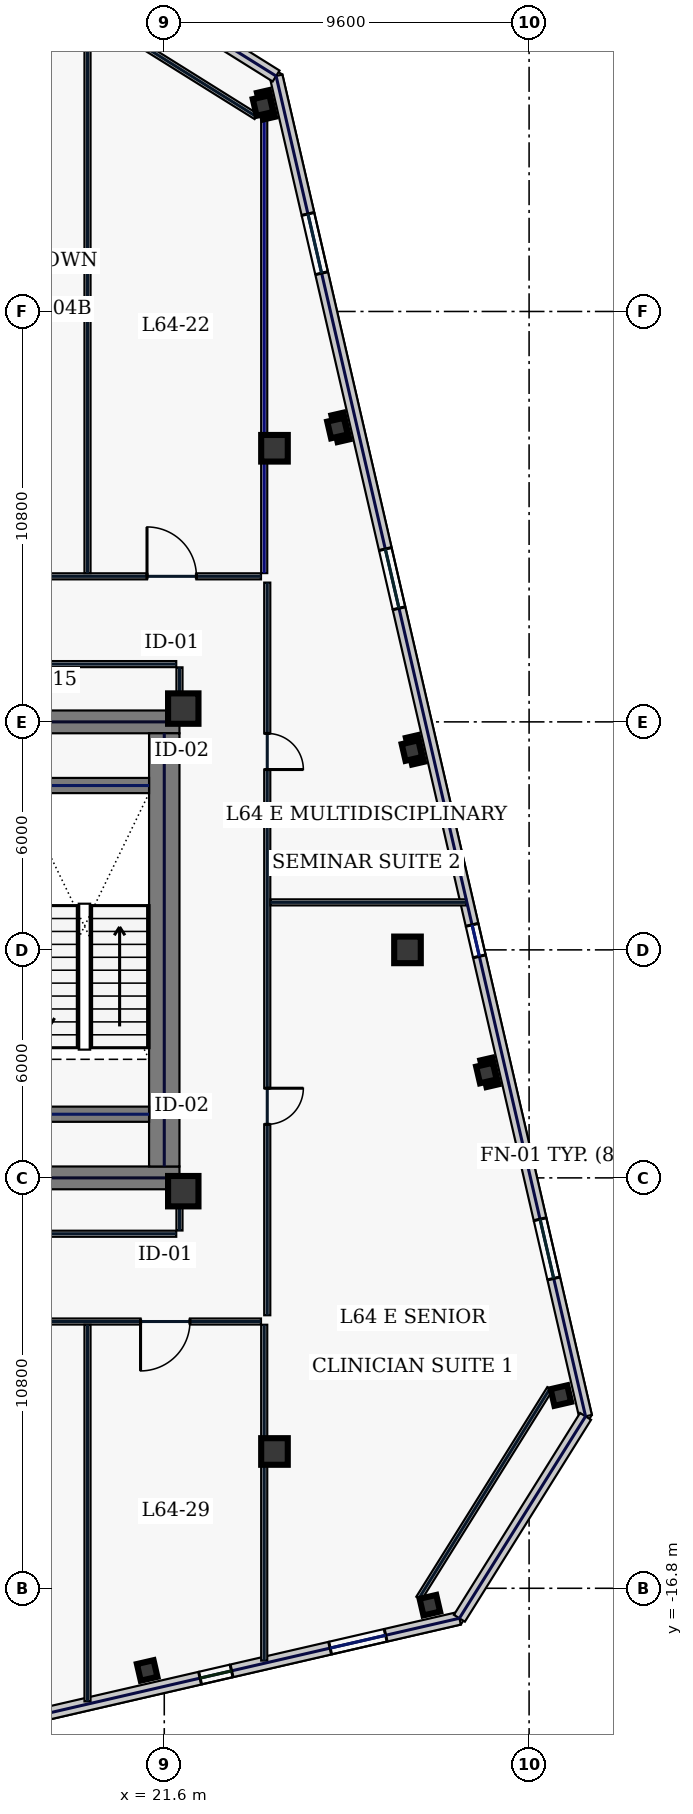
"""IFC4 building model, lengths in metres.
Left out: names, types, materials, properties, quantities, classifications, styles, units other than length and angle.
Written with IfcOpenShell. Run it as: python <this file> out.ifc"""

import sys

from ifc_helpers import new_model, si_unit, direction, frame, frame_2d, origin, origin_2d, place, context, subcontext, project, spatial, rectangle, hollow_rectangle, extrude, element, fill, save


model = new_model("IFC4")
c1 = context("Model", 3, precision=1e-05, world=origin(), true_north=direction((0.0, 1.0)))
c2 = subcontext(c1, "Body", "Model", "MODEL_VIEW")
j1 = project(units=[si_unit("LENGTHUNIT", "METRE"), si_unit("PLANEANGLEUNIT", "RADIAN")], contexts=[c1])
p1 = place(None, origin())
s1 = spatial("IfcSite", under=j1, at=p1, CompositionType="ELEMENT")
p2 = place(p1, origin())
s2 = spatial("IfcBuilding", under=s1, at=p2, CompositionType="ELEMENT")
p3 = place(p2, frame((0.0, 0.0, 277.0)))
s3 = spatial("IfcBuildingStorey", under=s2, at=p3, CompositionType="ELEMENT", Elevation=277.0)
for number, where, z_axis, x_axis in (
    (1, (10.5, 6.0, 0.0), (0.0, 0.0, 1.0), (1.0, 0.0, 0.0)),
    (2, (10.5, -6.0, 0.0), (0.0, 0.0, 1.0), (1.0, 0.0, 0.0)),
):
    element("IfcWall", number, at=place(p3, frame(where, z_axis=z_axis, x_axis=x_axis)), inside=s3, PredefinedType="SHEAR", context=c2, shape_type="SweptSolid", body=[
        extrude(rectangle(XDim=11.5, YDim=0.6, at=frame_2d((5.75, 0.0))), origin(), (0.0, 0.0, 1.0), 3.74),
    ])
p4 = place(p3, frame((21.6, -5.7, 0.0), z_axis=(0.0, 0.0, 1.0), x_axis=(0.0, 1.0, 0.0)))
e3 = element("IfcWall", 3, at=p4, inside=s3, PredefinedType="SHEAR", context=c2, shape_type="SweptSolid", body=[
    extrude(rectangle(XDim=11.4, YDim=0.8, at=frame_2d((5.7, 0.0))), origin(), (0.0, 0.0, 1.0), 3.74),
])
for number, where, z_axis, x_axis in (
    (4, (17.8, -4.325, 0.0), (0.0, 0.0, 1.0), (1.0, 0.0, 0.0)),
    (5, (17.8, 4.325, 0.0), (0.0, 0.0, 1.0), (1.0, 0.0, 0.0)),
):
    element("IfcWall", number, at=place(p3, frame(where, z_axis=z_axis, x_axis=x_axis)), inside=s3, PredefinedType="SHEAR", context=c2, shape_type="SweptSolid", body=[
        extrude(rectangle(XDim=3.4, YDim=0.4, at=frame_2d((1.7, 0.0))), origin(), (0.0, 0.0, 1.0), 3.74),
    ])
for number, where, z_axis, x_axis in (
    (6, (22.1, -6.35, 0.0), (0.0, 0.0, 1.0), (1.0, 0.0, 0.0)),
    (7, (22.1, 6.35, 0.0), (0.0, 0.0, 1.0), (1.0, 0.0, 0.0)),
):
    element("IfcColumn", number, at=place(p3, frame(where, z_axis=z_axis, x_axis=x_axis)), inside=s3, PredefinedType="COLUMN", context=c2, shape_type="SweptSolid", body=[
        extrude(hollow_rectangle(XDim=0.8, YDim=0.8, WallThickness=0.036, at=origin_2d()), origin(), (0.0, 0.0, 1.0), 3.74),
    ])
for number, where, z_axis, x_axis in (
    (8, (24.5, -13.2, 0.0), (0.0, 0.0, 1.0), (1.0, 0.0, 0.0)),
    (9, (24.5, 13.2, 0.0), (0.0, 0.0, 1.0), (1.0, 0.0, 0.0)),
    (10, (28.0, 0.0, 0.0), (0.0, 0.0, 1.0), (1.0, 0.0, 0.0)),
):
    element("IfcColumn", number, at=place(p3, frame(where, z_axis=z_axis, x_axis=x_axis)), inside=s3, PredefinedType="COLUMN", context=c2, shape_type="SweptSolid", body=[
        extrude(hollow_rectangle(XDim=0.7, YDim=0.7, WallThickness=0.032, at=origin_2d()), origin(), (0.0, 0.0, 1.0), 3.74),
    ])
for number, where, z_axis, x_axis in (
    (11, (21.15, -18.962, 0.0), (0.0, 0.0, 1.0), (0.974, 0.225, 0.0)),
    (12, (28.589, -17.245, 0.0), (0.0, 0.0, 1.0), (0.974, 0.225, 0.0)),
    (13, (32.036, -11.728, 0.0), (0.0, 0.0, 1.0), (0.974, 0.225, 0.0)),
    (14, (30.077, -3.241, 0.0), (0.0, 0.0, 1.0), (0.974, 0.225, 0.0)),
    (15, (28.117, 5.246, 0.0), (0.0, 0.0, 1.0), (0.974, 0.225, 0.0)),
    (16, (26.158, 13.732, 0.0), (0.0, 0.0, 1.0), (0.974, 0.225, 0.0)),
    (17, (24.198, 22.219, 0.0), (0.0, 0.0, 1.0), (0.974, 0.225, 0.0)),
):
    element("IfcColumn", number, at=place(p3, frame(where, z_axis=z_axis, x_axis=x_axis)), inside=s3, PredefinedType="COLUMN", context=c2, shape_type="SweptSolid", body=[
        extrude(hollow_rectangle(XDim=0.45, YDim=0.45, WallThickness=0.022, at=origin_2d()), origin(), (0.0, 0.0, 1.0), 3.74),
    ])
p5 = place(p3, frame((12.445, -21.495, 0.0), z_axis=(0.0, 0.0, 1.0), x_axis=(0.974369392164, 0.224953967767, 0.0)))
e18 = element("IfcWall", 18, at=p5, inside=s3, PredefinedType="STANDARD", context=c2, shape_type="SweptSolid", body=[
    extrude(rectangle(XDim=17.366, YDim=0.34, at=frame_2d((8.683, 0.0))), origin(), (0.0, 0.0, 1.0), 3.74),
])
p6 = place(p5, frame((3.378, 0.0, 0.9)))
e19 = element("IfcOpeningElement", 19, at=p6, cuts=e18, PredefinedType="OPENING", context=c2, shape_type="SweptSolid", body=[
    extrude(rectangle(XDim=0.85, YDim=1.85, at=frame_2d((0.425, 0.925))), frame((0.0, 0.18, 0.0), z_axis=(0.0, -1.0, 0.0), x_axis=(1.0, 0.0, 0.0)), (0.0, 0.0, 1.0), 0.36),
])
p7 = place(p5, frame((10.363, 0.0, 0.9)))
e20 = element("IfcOpeningElement", 20, at=p7, cuts=e18, PredefinedType="OPENING", context=c2, shape_type="SweptSolid", body=[
    extrude(rectangle(XDim=0.85, YDim=1.85, at=frame_2d((0.425, 0.925))), frame((0.0, 0.18, 0.0), z_axis=(0.0, -1.0, 0.0), x_axis=(1.0, 0.0, 0.0)), (0.0, 0.0, 1.0), 0.36),
])
p8 = place(p5, frame((13.875, 0.0, 0.9)))
e21 = element("IfcOpeningElement", 21, at=p8, cuts=e18, PredefinedType="OPENING", context=c2, shape_type="SweptSolid", body=[
    extrude(rectangle(XDim=1.5, YDim=2.0, at=frame_2d((0.75, 1.0))), frame((0.0, 0.18, 0.0), z_axis=(0.0, -1.0, 0.0), x_axis=(1.0, 0.0, 0.0)), (0.0, 0.0, 1.0), 0.36),
])
p9 = place(p3, frame((19.229, 26.316, 0.0), z_axis=(0.0, 0.0, 1.0), x_axis=(-0.974372473594, -0.224940620392, 0.0)))
e22 = element("IfcWall", 22, at=p9, inside=s3, PredefinedType="STANDARD", context=c2, shape_type="SweptSolid", body=[
    extrude(rectangle(XDim=17.366, YDim=0.34, at=frame_2d((8.683, 0.0))), origin(), (0.0, 0.0, 1.0), 3.74),
])
p10 = place(p9, frame((9.676, 0.0, 1.0)))
e23 = element("IfcOpeningElement", 23, at=p10, cuts=e22, PredefinedType="OPENING", context=c2, shape_type="SweptSolid", body=[
    extrude(rectangle(XDim=1.4, YDim=1.85, at=frame_2d((0.7, 0.925))), frame((0.0, 0.18, 0.0), z_axis=(0.0, -1.0, 0.0), x_axis=(1.0, 0.0, 0.0)), (0.0, 0.0, 1.0), 0.36),
])
p11 = place(p9, frame((2.041, 0.0, 1.0)))
e24 = element("IfcOpeningElement", 24, at=p11, cuts=e22, PredefinedType="OPENING", context=c2, shape_type="SweptSolid", body=[
    extrude(rectangle(XDim=1.4, YDim=1.85, at=frame_2d((0.7, 0.925))), frame((0.0, 0.18, 0.0), z_axis=(0.0, -1.0, 0.0), x_axis=(1.0, 0.0, 0.0)), (0.0, 0.0, 1.0), 0.36),
])
p12 = place(p3, frame((32.686, -12.276, 0.0), z_axis=(0.0, 0.0, 1.0), x_axis=(-0.224953091034, 0.974369594576, 0.0)))
e25 = element("IfcWall", 25, at=p12, inside=s3, PredefinedType="STANDARD", context=c2, shape_type="SweptSolid", body=[
    extrude(rectangle(XDim=36.2, YDim=0.34, at=frame_2d((18.1, 0.0))), origin(), (0.0, 0.0, 1.0), 3.74),
])
p13 = place(p12, frame((3.725, 0.0, 0.58)))
e26 = element("IfcOpeningElement", 26, at=p13, cuts=e25, PredefinedType="OPENING", context=c2, shape_type="SweptSolid", body=[
    extrude(rectangle(XDim=1.6, YDim=2.3, at=frame_2d((0.8, 1.15))), frame((0.0, 0.18, 0.0), z_axis=(0.0, -1.0, 0.0), x_axis=(1.0, 0.0, 0.0)), (0.0, 0.0, 1.0), 0.36),
])
p14 = place(p12, frame((12.425, 0.0, 0.75)))
e27 = element("IfcOpeningElement", 27, at=p14, cuts=e25, PredefinedType="OPENING", context=c2, shape_type="SweptSolid", body=[
    extrude(rectangle(XDim=0.85, YDim=1.85, at=frame_2d((0.425, 0.925))), frame((0.0, 0.18, 0.0), z_axis=(0.0, -1.0, 0.0), x_axis=(1.0, 0.0, 0.0)), (0.0, 0.0, 1.0), 0.36),
])
p15 = place(p12, frame((21.825, 0.0, 0.58)))
e28 = element("IfcOpeningElement", 28, at=p15, cuts=e25, PredefinedType="OPENING", context=c2, shape_type="SweptSolid", body=[
    extrude(rectangle(XDim=1.6, YDim=2.3, at=frame_2d((0.8, 1.15))), frame((0.0, 0.18, 0.0), z_axis=(0.0, -1.0, 0.0), x_axis=(1.0, 0.0, 0.0)), (0.0, 0.0, 1.0), 0.36),
])
p16 = place(p12, frame((30.875, 0.0, 0.22)))
e29 = element("IfcOpeningElement", 29, at=p16, cuts=e25, PredefinedType="OPENING", context=c2, shape_type="SweptSolid", body=[
    extrude(rectangle(XDim=1.6, YDim=1.2, at=frame_2d((0.8, 0.6))), frame((0.0, 0.18, 0.0), z_axis=(0.0, -1.0, 0.0), x_axis=(1.0, 0.0, 0.0)), (0.0, 0.0, 1.0), 0.36),
])
for number, where, z_axis, x_axis in (
    (30, (29.366, -17.589, 0.0), (0.0, 0.0, 1.0), (0.53, 0.848, 0.0)),
    (31, (24.542, 22.996, 0.0), (0.0, 0.0, 1.0), (-0.848, 0.53, 0.0)),
):
    element("IfcWall", number, at=place(p3, frame(where, z_axis=z_axis, x_axis=x_axis)), inside=s3, PredefinedType="STANDARD", context=c2, shape_type="SweptSolid", body=[
        extrude(rectangle(XDim=6.265, YDim=0.34, at=frame_2d((3.132, 0.0))), origin(), (0.0, 0.0, 1.0), 3.74),
    ])
for number, where, z_axis, x_axis in (
    (32, (28.3, -17.065, 0.0), (0.0, 0.0, 1.0), (0.53, 0.848, 0.0)),
    (33, (24.018, 21.931, 0.0), (0.0, 0.0, 1.0), (-0.848, 0.53, 0.0)),
):
    element("IfcWall", number, at=place(p3, frame(where, z_axis=z_axis, x_axis=x_axis)), inside=s3, PredefinedType="PARTITIONING", context=c2, shape_type="SweptSolid", body=[
        extrude(rectangle(XDim=6.505, YDim=0.16, at=frame_2d((3.253, 0.0))), origin(), (0.0, 0.0, 1.0), 3.74),
    ])
p17 = place(p3, frame((-24.145, 9.83, 0.0), z_axis=(0.0, 0.0, 1.0), x_axis=(1.0, 0.0, 0.0)))
e34 = element("IfcWall", 34, at=p17, inside=s3, PredefinedType="PARTITIONING", context=c2, shape_type="SweptSolid", body=[
    extrude(rectangle(XDim=48.29, YDim=0.16, at=frame_2d((24.145, 0.0))), origin(), (0.0, 0.0, 1.0), 3.74),
])
p18 = place(p17, frame((1.869, 0.0, 0.0)))
e35 = element("IfcOpeningElement", 35, at=p18, cuts=e34, PredefinedType="OPENING", context=c2, shape_type="SweptSolid", body=[
    extrude(rectangle(XDim=1.3, YDim=2.2, at=frame_2d((0.65, 1.1))), frame((0.0, 0.09, 0.0), z_axis=(0.0, -1.0, 0.0), x_axis=(1.0, 0.0, 0.0)), (0.0, 0.0, 1.0), 0.18),
])
p19 = place(p17, frame((9.565, 0.0, 0.0)))
e36 = element("IfcOpeningElement", 36, at=p19, cuts=e34, PredefinedType="OPENING", context=c2, shape_type="SweptSolid", body=[
    extrude(rectangle(XDim=1.05, YDim=2.2, at=frame_2d((0.525, 1.1))), frame((0.0, 0.09, 0.0), z_axis=(0.0, -1.0, 0.0), x_axis=(1.0, 0.0, 0.0)), (0.0, 0.0, 1.0), 0.18),
])
p20 = place(p17, frame((18.14, 0.0, 0.0)))
e37 = element("IfcOpeningElement", 37, at=p20, cuts=e34, PredefinedType="OPENING", context=c2, shape_type="SweptSolid", body=[
    extrude(rectangle(XDim=0.95, YDim=2.2, at=frame_2d((0.475, 1.1))), frame((0.0, 0.09, 0.0), z_axis=(0.0, -1.0, 0.0), x_axis=(1.0, 0.0, 0.0)), (0.0, 0.0, 1.0), 0.18),
])
p21 = place(p17, frame((26.58, 0.0, 0.0)))
e38 = element("IfcOpeningElement", 38, at=p21, cuts=e34, PredefinedType="OPENING", context=c2, shape_type="SweptSolid", body=[
    extrude(rectangle(XDim=0.95, YDim=2.2, at=frame_2d((0.475, 1.1))), frame((0.0, 0.09, 0.0), z_axis=(0.0, -1.0, 0.0), x_axis=(1.0, 0.0, 0.0)), (0.0, 0.0, 1.0), 0.18),
])
p22 = place(p17, frame((33.5, 0.0, 0.0)))
e39 = element("IfcOpeningElement", 39, at=p22, cuts=e34, PredefinedType="OPENING", context=c2, shape_type="SweptSolid", body=[
    extrude(rectangle(XDim=1.3, YDim=2.2, at=frame_2d((0.65, 1.1))), frame((0.0, 0.09, 0.0), z_axis=(0.0, -1.0, 0.0), x_axis=(1.0, 0.0, 0.0)), (0.0, 0.0, 1.0), 0.18),
])
p23 = place(p17, frame((40.09, 0.0, 0.0)))
e40 = element("IfcOpeningElement", 40, at=p23, cuts=e34, PredefinedType="OPENING", context=c2, shape_type="SweptSolid", body=[
    extrude(rectangle(XDim=1.45, YDim=2.2, at=frame_2d((0.725, 1.1))), frame((0.0, 0.09, 0.0), z_axis=(0.0, -1.0, 0.0), x_axis=(1.0, 0.0, 0.0)), (0.0, 0.0, 1.0), 0.18),
])
p24 = place(p17, frame((45.291, 0.0, 0.0)))
e41 = element("IfcOpeningElement", 41, at=p24, cuts=e34, PredefinedType="OPENING", context=c2, shape_type="SweptSolid", body=[
    extrude(rectangle(XDim=1.3, YDim=2.2, at=frame_2d((0.65, 1.1))), frame((0.0, 0.09, 0.0), z_axis=(0.0, -1.0, 0.0), x_axis=(1.0, 0.0, 0.0)), (0.0, 0.0, 1.0), 0.18),
])
p25 = place(p3, frame((24.31, 9.665, 0.0), z_axis=(0.0, 0.0, 1.0), x_axis=(0.0, -1.0, 0.0)))
e42 = element("IfcWall", 42, at=p25, inside=s3, PredefinedType="PARTITIONING", context=c2, shape_type="SweptSolid", body=[
    extrude(rectangle(XDim=19.28, YDim=0.16, at=frame_2d((9.64, 0.0))), origin(), (0.0, 0.0, 1.0), 3.74),
])
p26 = place(p25, frame((13.306, 0.0, 0.0)))
e43 = element("IfcOpeningElement", 43, at=p26, cuts=e42, PredefinedType="OPENING", context=c2, shape_type="SweptSolid", body=[
    extrude(rectangle(XDim=0.95, YDim=2.2, at=frame_2d((0.475, 1.1))), frame((0.0, 0.09, 0.0), z_axis=(0.0, -1.0, 0.0), x_axis=(1.0, 0.0, 0.0)), (0.0, 0.0, 1.0), 0.18),
])
p27 = place(p25, frame((3.969, 0.0, 0.0)))
e44 = element("IfcOpeningElement", 44, at=p27, cuts=e42, PredefinedType="OPENING", context=c2, shape_type="SweptSolid", body=[
    extrude(rectangle(XDim=0.95, YDim=2.2, at=frame_2d((0.475, 1.1))), frame((0.0, 0.09, 0.0), z_axis=(0.0, -1.0, 0.0), x_axis=(1.0, 0.0, 0.0)), (0.0, 0.0, 1.0), 0.18),
])
p28 = place(p3, frame((24.145, -9.78, 0.0), z_axis=(0.0, 0.0, 1.0), x_axis=(-1.0, 0.0, 0.0)))
e45 = element("IfcWall", 45, at=p28, inside=s3, PredefinedType="PARTITIONING", context=c2, shape_type="SweptSolid", body=[
    extrude(rectangle(XDim=36.68, YDim=0.16, at=frame_2d((18.34, 0.0))), origin(), (0.0, 0.0, 1.0), 3.74),
])
p29 = place(p28, frame((30.646, 0.0, 0.0)))
e46 = element("IfcOpeningElement", 46, at=p29, cuts=e45, PredefinedType="OPENING", context=c2, shape_type="SweptSolid", body=[
    extrude(rectangle(XDim=0.95, YDim=2.2, at=frame_2d((0.475, 1.1))), frame((0.0, 0.09, 0.0), z_axis=(0.0, -1.0, 0.0), x_axis=(1.0, 0.0, 0.0)), (0.0, 0.0, 1.0), 0.18),
])
p30 = place(p28, frame((23.136, 0.0, 0.0)))
e47 = element("IfcOpeningElement", 47, at=p30, cuts=e45, PredefinedType="OPENING", context=c2, shape_type="SweptSolid", body=[
    extrude(rectangle(XDim=0.95, YDim=2.2, at=frame_2d((0.475, 1.1))), frame((0.0, 0.09, 0.0), z_axis=(0.0, -1.0, 0.0), x_axis=(1.0, 0.0, 0.0)), (0.0, 0.0, 1.0), 0.18),
])
p31 = place(p28, frame((14.095, 0.0, 0.0)))
e48 = element("IfcOpeningElement", 48, at=p31, cuts=e45, PredefinedType="OPENING", context=c2, shape_type="SweptSolid", body=[
    extrude(rectangle(XDim=1.05, YDim=2.2, at=frame_2d((0.525, 1.1))), frame((0.0, 0.09, 0.0), z_axis=(0.0, -1.0, 0.0), x_axis=(1.0, 0.0, 0.0)), (0.0, 0.0, 1.0), 0.18),
])
p32 = place(p28, frame((6.405, 0.0, 0.0)))
e49 = element("IfcOpeningElement", 49, at=p32, cuts=e45, PredefinedType="OPENING", context=c2, shape_type="SweptSolid", body=[
    extrude(rectangle(XDim=1.15, YDim=2.2, at=frame_2d((0.575, 1.1))), frame((0.0, 0.09, 0.0), z_axis=(0.0, -1.0, 0.0), x_axis=(1.0, 0.0, 0.0)), (0.0, 0.0, 1.0), 0.18),
])
p33 = place(p28, frame((1.869, 0.0, 0.0)))
e50 = element("IfcOpeningElement", 50, at=p33, cuts=e45, PredefinedType="OPENING", context=c2, shape_type="SweptSolid", body=[
    extrude(rectangle(XDim=1.3, YDim=2.2, at=frame_2d((0.65, 1.1))), frame((0.0, 0.09, 0.0), z_axis=(0.0, -1.0, 0.0), x_axis=(1.0, 0.0, 0.0)), (0.0, 0.0, 1.0), 0.18),
])
for number, where, z_axis, x_axis in (
    (51, (21.915, 7.52, 0.0), (0.0, 0.0, 1.0), (-1.0, 0.0, 0.0)),
    (52, (10.715, -7.47, 0.0), (0.0, 0.0, 1.0), (1.0, 0.0, 0.0)),
):
    element("IfcWall", number, at=place(p3, frame(where, z_axis=z_axis, x_axis=x_axis)), inside=s3, PredefinedType="PARTITIONING", context=c2, shape_type="SweptSolid", body=[
        extrude(rectangle(XDim=11.2, YDim=0.16, at=frame_2d((5.6, 0.0))), origin(), (0.0, 0.0, 1.0), 3.74),
    ])
p34 = place(p3, frame((22.0, -7.385, 0.0), z_axis=(0.0, 0.0, 1.0), x_axis=(0.0, 1.0, 0.0)))
e53 = element("IfcWall", 53, at=p34, inside=s3, PredefinedType="PARTITIONING", context=c2, shape_type="SweptSolid", body=[
    extrude(rectangle(XDim=0.965, YDim=0.16, at=frame_2d((0.482, 0.0))), origin(), (0.0, 0.0, 1.0), 3.74),
])
p35 = place(p3, frame((22.0, 6.42, 0.0), z_axis=(0.0, 0.0, 1.0), x_axis=(0.0, 1.0, 0.0)))
e54 = element("IfcWall", 54, at=p35, inside=s3, PredefinedType="PARTITIONING", context=c2, shape_type="SweptSolid", body=[
    extrude(rectangle(XDim=1.015, YDim=0.16, at=frame_2d((0.508, 0.0))), origin(), (0.0, 0.0, 1.0), 3.74),
])
p36 = place(p3, frame((24.23, 9.915, 0.0), z_axis=(0.0, 0.0, 1.0), x_axis=(0.0, 1.0, 0.0)))
e55 = element("IfcWall", 55, at=p36, inside=s3, PredefinedType="PARTITIONING", context=c2, shape_type="SweptSolid", body=[
    extrude(rectangle(XDim=12.656, YDim=0.16, at=frame_2d((6.328, 0.0))), origin(), (0.0, 0.0, 1.0), 2.135),
])
p37 = place(p3, frame((24.23, -18.703, 0.0), z_axis=(0.0, 0.0, 1.0), x_axis=(0.0, 1.0, 0.0)))
e56 = element("IfcWall", 56, at=p37, inside=s3, PredefinedType="PARTITIONING", context=c2, shape_type="SweptSolid", body=[
    extrude(rectangle(XDim=8.838, YDim=0.16, at=frame_2d((4.419, 0.0))), origin(), (0.0, 0.0, 1.0), 3.74),
])
p38 = place(p3, frame((19.58, 9.915, 0.0), z_axis=(0.0, 0.0, 1.0), x_axis=(0.0, 1.0, 0.0)))
e57 = element("IfcWall", 57, at=p38, inside=s3, PredefinedType="PARTITIONING", context=c2, shape_type="SweptSolid", body=[
    extrude(rectangle(XDim=14.798, YDim=0.16, at=frame_2d((7.399, 0.0))), origin(), (0.0, 0.0, 1.0), 3.74),
])
p39 = place(p3, frame((19.58, -19.776, 0.0), z_axis=(0.0, 0.0, 1.0), x_axis=(0.0, 1.0, 0.0)))
e58 = element("IfcWall", 58, at=p39, inside=s3, PredefinedType="PARTITIONING", context=c2, shape_type="SweptSolid", body=[
    extrude(rectangle(XDim=9.911, YDim=0.16, at=frame_2d((4.956, 0.0))), origin(), (0.0, 0.0, 1.0), 3.74),
])
p40 = place(p3, frame((24.395, 1.25, 0.0), z_axis=(0.0, 0.0, 1.0), x_axis=(1.0, 0.0, 0.0)))
e59 = element("IfcWall", 59, at=p40, inside=s3, PredefinedType="PARTITIONING", context=c2, shape_type="SweptSolid", body=[
    extrude(rectangle(XDim=5.147, YDim=0.16, at=frame_2d((2.574, 0.0))), origin(), (0.0, 0.0, 1.0), 3.74),
])
p41 = place(p7, origin())
e60 = element("IfcWindow", 60, at=p41, inside=s3, PartitioningType="SINGLE_PANEL", PredefinedType="WINDOW", context=c2, shape_type="SweptSolid", body=[
    extrude(rectangle(XDim=0.85, YDim=1.85, at=frame_2d((0.425, 0.925))), frame((0.0, 0.03, 0.0), z_axis=(0.0, -1.0, 0.0), x_axis=(1.0, 0.0, 0.0)), (0.0, 0.0, 1.0), 0.06),
])
fill(e20, e60)
p42 = place(p8, origin())
e61 = element("IfcWindow", 61, at=p42, inside=s3, PartitioningType="SINGLE_PANEL", PredefinedType="WINDOW", context=c2, shape_type="SweptSolid", body=[
    extrude(rectangle(XDim=1.5, YDim=2.0, at=frame_2d((0.75, 1.0))), frame((0.0, 0.03, 0.0), z_axis=(0.0, -1.0, 0.0), x_axis=(1.0, 0.0, 0.0)), (0.0, 0.0, 1.0), 0.06),
])
fill(e21, e61)
p43 = place(p13, origin())
e62 = element("IfcWindow", 62, at=p43, inside=s3, PartitioningType="SINGLE_PANEL", PredefinedType="WINDOW", context=c2, shape_type="SweptSolid", body=[
    extrude(rectangle(XDim=1.6, YDim=2.3, at=frame_2d((0.8, 1.15))), frame((0.0, 0.03, 0.0), z_axis=(0.0, -1.0, 0.0), x_axis=(1.0, 0.0, 0.0)), (0.0, 0.0, 1.0), 0.06),
])
fill(e26, e62)
p44 = place(p14, origin())
e63 = element("IfcWindow", 63, at=p44, inside=s3, PartitioningType="SINGLE_PANEL", PredefinedType="WINDOW", context=c2, shape_type="SweptSolid", body=[
    extrude(rectangle(XDim=0.85, YDim=1.85, at=frame_2d((0.425, 0.925))), frame((0.0, 0.03, 0.0), z_axis=(0.0, -1.0, 0.0), x_axis=(1.0, 0.0, 0.0)), (0.0, 0.0, 1.0), 0.06),
])
fill(e27, e63)
p45 = place(p15, origin())
e64 = element("IfcWindow", 64, at=p45, inside=s3, PartitioningType="SINGLE_PANEL", PredefinedType="WINDOW", context=c2, shape_type="SweptSolid", body=[
    extrude(rectangle(XDim=1.6, YDim=2.3, at=frame_2d((0.8, 1.15))), frame((0.0, 0.03, 0.0), z_axis=(0.0, -1.0, 0.0), x_axis=(1.0, 0.0, 0.0)), (0.0, 0.0, 1.0), 0.06),
])
fill(e28, e64)
p46 = place(p16, origin())
e65 = element("IfcWindow", 65, at=p46, inside=s3, PartitioningType="SINGLE_PANEL", PredefinedType="WINDOW", context=c2, shape_type="SweptSolid", body=[
    extrude(rectangle(XDim=1.6, YDim=1.2, at=frame_2d((0.8, 0.6))), frame((0.0, 0.03, 0.0), z_axis=(0.0, -1.0, 0.0), x_axis=(1.0, 0.0, 0.0)), (0.0, 0.0, 1.0), 0.06),
])
fill(e29, e65)
p47 = place(p24, origin())
e66 = element("IfcDoor", 66, at=p47, inside=s3, OperationType="SINGLE_SWING_LEFT", PredefinedType="DOOR", context=c2, shape_type="SweptSolid", body=[
    extrude(rectangle(XDim=1.3, YDim=2.2, at=frame_2d((0.65, 1.1))), frame((0.0, 0.025, 0.0), z_axis=(0.0, -1.0, 0.0), x_axis=(1.0, 0.0, 0.0)), (0.0, 0.0, 1.0), 0.05),
])
fill(e41, e66)
p48 = place(p33, origin())
e67 = element("IfcDoor", 67, at=p48, inside=s3, OperationType="SINGLE_SWING_RIGHT", PredefinedType="DOOR", context=c2, shape_type="SweptSolid", body=[
    extrude(rectangle(XDim=1.3, YDim=2.2, at=frame_2d((0.65, 1.1))), frame((0.0, 0.025, 0.0), z_axis=(0.0, -1.0, 0.0), x_axis=(1.0, 0.0, 0.0)), (0.0, 0.0, 1.0), 0.05),
])
fill(e50, e67)
p49 = place(p26, origin())
e68 = element("IfcDoor", 68, at=p49, inside=s3, OperationType="SINGLE_SWING_LEFT", PredefinedType="DOOR", context=c2, shape_type="SweptSolid", body=[
    extrude(rectangle(XDim=0.95, YDim=2.2, at=frame_2d((0.475, 1.1))), frame((0.0, 0.025, 0.0), z_axis=(0.0, -1.0, 0.0), x_axis=(1.0, 0.0, 0.0)), (0.0, 0.0, 1.0), 0.05),
])
fill(e43, e68)
p50 = place(p27, origin())
e69 = element("IfcDoor", 69, at=p50, inside=s3, OperationType="SINGLE_SWING_RIGHT", PredefinedType="DOOR", context=c2, shape_type="SweptSolid", body=[
    extrude(rectangle(XDim=0.95, YDim=2.2, at=frame_2d((0.475, 1.1))), frame((0.0, 0.025, 0.0), z_axis=(0.0, -1.0, 0.0), x_axis=(1.0, 0.0, 0.0)), (0.0, 0.0, 1.0), 0.05),
])
fill(e44, e69)
save(model, sys.argv[1])
